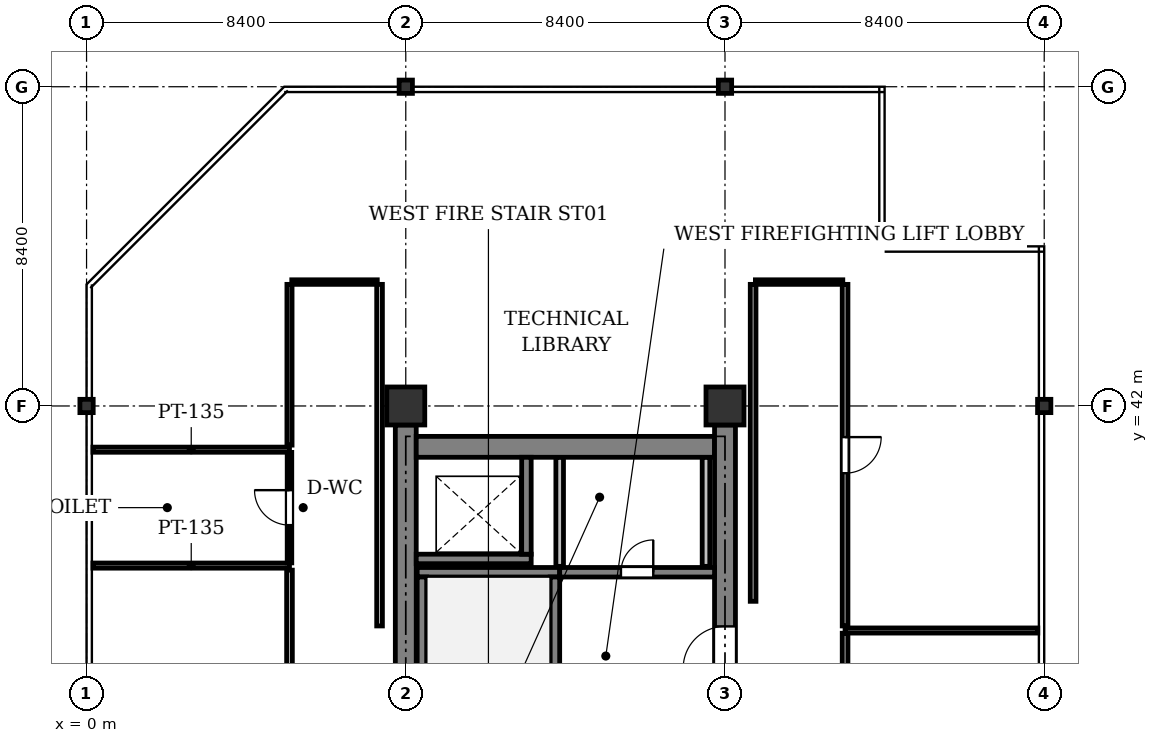
"""IFC4 building model, lengths in metres.
Left out: names, types, materials, properties, quantities, classifications, styles, units other than length and angle.
Written with IfcOpenShell. Run it as: python <this file> out.ifc"""

import sys

from ifc_helpers import new_model, si_unit, direction, frame, frame_2d, origin, origin_2d, place, context, subcontext, project, spatial, rectangle, i_section, extrude, element, fill, save


model = new_model("IFC4")
c1 = context("Model", 3, precision=1e-05, world=origin(), true_north=direction((0.0, 1.0)))
c2 = subcontext(c1, "Body", "Model", "MODEL_VIEW")
j1 = project(units=[si_unit("LENGTHUNIT", "METRE"), si_unit("PLANEANGLEUNIT", "RADIAN")], contexts=[c1])
p1 = place(None, origin())
s1 = spatial("IfcSite", under=j1, at=p1, CompositionType="ELEMENT")
p2 = place(p1, origin())
s2 = spatial("IfcBuilding", under=s1, at=p2, CompositionType="ELEMENT")
p3 = place(p2, frame((0.0, 0.0, 196.0)))
s3 = spatial("IfcBuildingStorey", under=s2, at=p3, CompositionType="ELEMENT", Elevation=196.0)
p4 = place(p3, frame((0.0, 42.0, 0.0), z_axis=(0.0, 0.0, 1.0), x_axis=(1.0, 0.0, 0.0)))
e1 = element("IfcColumn", 1, at=p4, inside=s3, PredefinedType="COLUMN", context=c2, shape_type="SweptSolid", body=[
    extrude(i_section(OverallWidth=0.35, OverallDepth=0.35, WebThickness=0.02, FlangeThickness=0.032, at=origin_2d()), origin(), (0.0, 0.0, 1.0), 4.1),
])
p5 = place(p3, frame((8.4, 42.0, 0.0), z_axis=(0.0, 0.0, 1.0), x_axis=(1.0, 0.0, 0.0)))
e2 = element("IfcColumn", 2, at=p5, inside=s3, PredefinedType="COLUMN", context=c2, shape_type="SweptSolid", body=[
    extrude(rectangle(XDim=1.0, YDim=1.0, at=origin_2d()), origin(), (0.0, 0.0, 1.0), 4.1),
])
p6 = place(p3, frame((8.4, 50.4, 0.0), z_axis=(0.0, 0.0, 1.0), x_axis=(1.0, 0.0, 0.0)))
e3 = element("IfcColumn", 3, at=p6, inside=s3, PredefinedType="COLUMN", context=c2, shape_type="SweptSolid", body=[
    extrude(i_section(OverallWidth=0.35, OverallDepth=0.35, WebThickness=0.02, FlangeThickness=0.032, at=origin_2d()), origin(), (0.0, 0.0, 1.0), 4.1),
])
p7 = place(p3, frame((16.8, 42.0, 0.0), z_axis=(0.0, 0.0, 1.0), x_axis=(1.0, 0.0, 0.0)))
e4 = element("IfcColumn", 4, at=p7, inside=s3, PredefinedType="COLUMN", context=c2, shape_type="SweptSolid", body=[
    extrude(rectangle(XDim=1.0, YDim=1.0, at=origin_2d()), origin(), (0.0, 0.0, 1.0), 4.1),
])
for number, where, z_axis, x_axis in (
    (5, (16.8, 50.4, 0.0), (0.0, 0.0, 1.0), (1.0, 0.0, 0.0)),
    (6, (25.2, 42.0, 0.0), (0.0, 0.0, 1.0), (1.0, 0.0, 0.0)),
):
    element("IfcColumn", number, at=place(p3, frame(where, z_axis=z_axis, x_axis=x_axis)), inside=s3, PredefinedType="COLUMN", context=c2, shape_type="SweptSolid", body=[
        extrude(i_section(OverallWidth=0.35, OverallDepth=0.35, WebThickness=0.02, FlangeThickness=0.032, at=origin_2d()), origin(), (0.0, 0.0, 1.0), 4.1),
    ])
p8 = place(p3, frame((8.4, 34.1, 0.0), z_axis=(0.0, 0.0, 1.0), x_axis=(0.0, 1.0, 0.0)))
e7 = element("IfcWall", 7, at=p8, inside=s3, PredefinedType="SHEAR", context=c2, shape_type="SweptSolid", body=[
    extrude(rectangle(XDim=7.4, YDim=0.55, at=frame_2d((3.7, 0.0))), origin(), (0.0, 0.0, 1.0), 3.825),
])
p9 = place(p3, frame((8.675, 40.925, 0.0), z_axis=(0.0, 0.0, 1.0), x_axis=(1.0, 0.0, 0.0)))
e8 = element("IfcWall", 8, at=p9, inside=s3, PredefinedType="SHEAR", context=c2, shape_type="SweptSolid", body=[
    extrude(rectangle(XDim=7.85, YDim=0.55, at=frame_2d((3.925, 0.0))), origin(), (0.0, 0.0, 1.0), 3.825),
])
p10 = place(p3, frame((16.8, 34.1, 0.0), z_axis=(0.0, 0.0, 1.0), x_axis=(0.0, 1.0, 0.0)))
e9 = element("IfcWall", 9, at=p10, inside=s3, PredefinedType="SHEAR", context=c2, shape_type="SweptSolid", body=[
    extrude(rectangle(XDim=7.4, YDim=0.55, at=frame_2d((3.7, 0.0))), origin(), (0.0, 0.0, 1.0), 3.825),
])
p11 = place(p10, frame((1.0, 0.0, 0.0)))
e10 = element("IfcOpeningElement", 10, at=p11, cuts=e9, PredefinedType="OPENING", context=c2, shape_type="SweptSolid", body=[
    extrude(rectangle(XDim=1.1, YDim=2.15, at=frame_2d((0.55, 1.075))), frame((0.0, 0.285, 0.0), z_axis=(0.0, -1.0, 0.0), x_axis=(1.0, 0.0, 0.0)), (0.0, 0.0, 1.0), 0.57),
])
p12 = place(p3, frame((12.45, 37.625, 0.0), z_axis=(0.0, 0.0, 1.0), x_axis=(-1.0, 0.0, 0.0)))
e11 = element("IfcWall", 11, at=p12, inside=s3, PredefinedType="SHEAR", context=c2, shape_type="SweptSolid", body=[
    extrude(rectangle(XDim=3.75, YDim=0.25, at=frame_2d((1.875, 0.0))), origin(), (0.0, 0.0, 1.0), 3.825),
])
p13 = place(p3, frame((12.325, 29.75, 0.0), z_axis=(0.0, 0.0, 1.0), x_axis=(0.0, 1.0, 0.0)))
e12 = element("IfcWall", 12, at=p13, inside=s3, PredefinedType="SHEAR", context=c2, shape_type="SweptSolid", body=[
    extrude(rectangle(XDim=7.75, YDim=0.25, at=frame_2d((3.875, 0.0))), origin(), (0.0, 0.0, 1.0), 3.825),
])
p14 = place(p13, frame((0.22, 0.0, 0.0)))
e13 = element("IfcOpeningElement", 13, at=p14, cuts=e12, PredefinedType="OPENING", context=c2, shape_type="SweptSolid", body=[
    extrude(rectangle(XDim=1.1, YDim=2.15, at=frame_2d((0.55, 1.075))), frame((0.0, 0.135, 0.0), z_axis=(0.0, -1.0, 0.0), x_axis=(1.0, 0.0, 0.0)), (0.0, 0.0, 1.0), 0.27),
])
p15 = place(p3, frame((8.825, 29.75, 0.0), z_axis=(0.0, 0.0, 1.0), x_axis=(0.0, 1.0, 0.0)))
e14 = element("IfcWall", 14, at=p15, inside=s3, PredefinedType="SHEAR", context=c2, shape_type="SweptSolid", body=[
    extrude(rectangle(XDim=7.75, YDim=0.25, at=frame_2d((3.875, 0.0))), origin(), (0.0, 0.0, 1.0), 3.825),
])
p16 = place(p3, frame((8.675, 37.975, 0.0), z_axis=(0.0, 0.0, 1.0), x_axis=(1.0, 0.0, 0.0)))
e15 = element("IfcWall", 15, at=p16, inside=s3, PredefinedType="SHEAR", context=c2, shape_type="SweptSolid", body=[
    extrude(rectangle(XDim=3.025, YDim=0.25, at=frame_2d((1.512, 0.0))), origin(), (0.0, 0.0, 1.0), 3.825),
])
p17 = place(p3, frame((11.575, 38.1, 0.0), z_axis=(0.0, 0.0, 1.0), x_axis=(0.0, 1.0, 0.0)))
e16 = element("IfcWall", 16, at=p17, inside=s3, PredefinedType="SHEAR", context=c2, shape_type="SweptSolid", body=[
    extrude(rectangle(XDim=2.55, YDim=0.25, at=frame_2d((1.275, 0.0))), origin(), (0.0, 0.0, 1.0), 3.825),
])
p18 = place(p3, frame((12.45, 37.625, 0.0), z_axis=(0.0, 0.0, 1.0), x_axis=(1.0, 0.0, 0.0)))
e17 = element("IfcWall", 17, at=p18, inside=s3, PredefinedType="SHEAR", context=c2, shape_type="SweptSolid", body=[
    extrude(rectangle(XDim=4.075, YDim=0.25, at=frame_2d((2.038, 0.0))), origin(), (0.0, 0.0, 1.0), 3.825),
])
p19 = place(p18, frame((1.613, 0.0, 0.0)))
e18 = element("IfcOpeningElement", 18, at=p19, cuts=e17, PredefinedType="OPENING", context=c2, shape_type="SweptSolid", body=[
    extrude(rectangle(XDim=0.85, YDim=2.15, at=frame_2d((0.425, 1.075))), frame((0.0, 0.135, 0.0), z_axis=(0.0, -1.0, 0.0), x_axis=(1.0, 0.0, 0.0)), (0.0, 0.0, 1.0), 0.27),
])
for number, where, z_axis, x_axis in (
    (19, (16.3, 37.78, 0.0), (0.0, 0.0, 1.0), (0.0, 1.0, 0.0)),
    (20, (12.45, 40.646, 0.0), (0.0, 0.0, 1.0), (0.0, -1.0, 0.0)),
):
    element("IfcWall", number, at=place(p3, frame(where, z_axis=z_axis, x_axis=x_axis)), inside=s3, PredefinedType="PARTITIONING", context=c2, shape_type="SweptSolid", body=[
        extrude(rectangle(XDim=2.866, YDim=0.2, at=frame_2d((1.433, 0.0))), origin(), (0.0, 0.0, 1.0), 2.875),
    ])
for number, where, z_axis, x_axis in (
    (21, (5.34, 40.85, 0.0), (0.0, 0.0, 1.0), (-1.0, 0.0, 0.0)),
    (22, (0.169, 37.8, 0.0), (0.0, 0.0, 1.0), (1.0, 0.0, 0.0)),
):
    element("IfcWall", number, at=place(p3, frame(where, z_axis=z_axis, x_axis=x_axis)), inside=s3, PredefinedType="PARTITIONING", context=c2, shape_type="SweptSolid", body=[
        extrude(rectangle(XDim=5.171, YDim=0.135, at=frame_2d((2.585, 0.0))), origin(), (0.0, 0.0, 1.0), 3.518),
    ])
p20 = place(p3, frame((5.34, 37.872, 0.0), z_axis=(0.0, 0.0, 1.0), x_axis=(0.0, 1.0, 0.0)))
e23 = element("IfcWall", 23, at=p20, inside=s3, PredefinedType="PARTITIONING", context=c2, shape_type="SweptSolid", body=[
    extrude(rectangle(XDim=2.907, YDim=0.12, at=frame_2d((1.454, 0.0))), origin(), (0.0, 0.0, 1.0), 3.825),
])
p21 = place(p20, frame((0.993, 0.0, 0.0)))
e24 = element("IfcOpeningElement", 24, at=p21, cuts=e23, PredefinedType="OPENING", context=c2, shape_type="SweptSolid", body=[
    extrude(rectangle(XDim=0.92, YDim=2.1, at=frame_2d((0.46, 1.05))), frame((0.0, 0.07, 0.0), z_axis=(0.0, -1.0, 0.0), x_axis=(1.0, 0.0, 0.0)), (0.0, 0.0, 1.0), 0.14),
])
p22 = place(p3, frame((25.031, 36.092, 0.0), z_axis=(0.0, 0.0, 1.0), x_axis=(-1.0, 0.0, 0.0)))
e25 = element("IfcWall", 25, at=p22, inside=s3, PredefinedType="PARTITIONING", context=c2, shape_type="SweptSolid", body=[
    extrude(rectangle(XDim=5.071, YDim=0.135, at=frame_2d((2.536, 0.0))), origin(), (0.0, 0.0, 1.0), 3.518),
])
p23 = place(p3, frame((19.96, 36.021, 0.0), z_axis=(0.0, 0.0, 1.0), x_axis=(0.0, -1.0, 0.0)))
e26 = element("IfcWall", 26, at=p23, inside=s3, PredefinedType="PARTITIONING", context=c2, shape_type="SweptSolid", body=[
    extrude(rectangle(XDim=13.17, YDim=0.15, at=frame_2d((6.585, 0.0))), origin(), (0.0, 0.0, 1.0), 3.365),
])
p24 = place(p3, frame((5.34, 18.76, 0.0), z_axis=(0.0, 0.0, 1.0), x_axis=(0.0, 1.0, 0.0)))
e27 = element("IfcWall", 27, at=p24, inside=s3, PredefinedType="PARTITIONING", context=c2, shape_type="SweptSolid", body=[
    extrude(rectangle(XDim=18.92, YDim=0.15, at=frame_2d((9.46, 0.0))), origin(), (0.0, 0.0, 1.0), 3.213),
])
p25 = place(p24, frame((8.985, 0.0, 0.0)))
e28 = element("IfcOpeningElement", 28, at=p25, cuts=e27, PredefinedType="OPENING", context=c2, shape_type="SweptSolid", body=[
    extrude(rectangle(XDim=0.95, YDim=2.15, at=frame_2d((0.475, 1.075))), frame((0.0, 0.085, 0.0), z_axis=(0.0, -1.0, 0.0), x_axis=(1.0, 0.0, 0.0)), (0.0, 0.0, 1.0), 0.17),
])
p26 = place(p3, frame((19.96, 45.2, 0.0), z_axis=(0.0, 0.0, 1.0), x_axis=(0.0, -1.0, 0.0)))
e29 = element("IfcWall", 29, at=p26, inside=s3, PredefinedType="PARTITIONING", context=c2, shape_type="SweptSolid", body=[
    extrude(rectangle(XDim=8.988, YDim=0.15, at=frame_2d((4.494, 0.0))), origin(), (0.0, 0.0, 1.0), 3.365),
])
p27 = place(p26, frame((4.019, 0.0, 0.0)))
e30 = element("IfcOpeningElement", 30, at=p27, cuts=e29, PredefinedType="OPENING", context=c2, shape_type="SweptSolid", body=[
    extrude(rectangle(XDim=0.95, YDim=2.15, at=frame_2d((0.475, 1.075))), frame((0.0, 0.085, 0.0), z_axis=(0.0, -1.0, 0.0), x_axis=(1.0, 0.0, 0.0)), (0.0, 0.0, 1.0), 0.17),
])
p28 = place(p3, frame((5.34, 40.97, 0.0), z_axis=(0.0, 0.0, 1.0), x_axis=(0.0, 1.0, 0.0)))
e31 = element("IfcWall", 31, at=p28, inside=s3, PredefinedType="PARTITIONING", context=c2, shape_type="SweptSolid", body=[
    extrude(rectangle(XDim=4.23, YDim=0.135, at=frame_2d((2.115, 0.0))), origin(), (0.0, 0.0, 1.0), 3.365),
])
p29 = place(p3, frame((5.4, 45.26, 0.0), z_axis=(0.0, 0.0, 1.0), x_axis=(1.0, 0.0, 0.0)))
e32 = element("IfcWall", 32, at=p29, inside=s3, PredefinedType="PARTITIONING", context=c2, shape_type="SweptSolid", body=[
    extrude(rectangle(XDim=2.25, YDim=0.12, at=frame_2d((1.125, 0.0))), origin(), (0.0, 0.0, 1.0), 3.825),
])
p30 = place(p3, frame((7.71, 45.2, 0.0), z_axis=(0.0, 0.0, 1.0), x_axis=(0.0, -1.0, 0.0)))
e33 = element("IfcWall", 33, at=p30, inside=s3, PredefinedType="PARTITIONING", context=c2, shape_type="SweptSolid", body=[
    extrude(rectangle(XDim=8.988, YDim=0.15, at=frame_2d((4.494, 0.0))), origin(), (0.0, 0.0, 1.0), 3.365),
])
p31 = place(p3, frame((17.54, 36.86, 0.0), z_axis=(0.0, 0.0, 1.0), x_axis=(0.0, 1.0, 0.0)))
e34 = element("IfcWall", 34, at=p31, inside=s3, PredefinedType="PARTITIONING", context=c2, shape_type="SweptSolid", body=[
    extrude(rectangle(XDim=8.34, YDim=0.15, at=frame_2d((4.17, 0.0))), origin(), (0.0, 0.0, 1.0), 3.365),
])
p32 = place(p3, frame((17.6, 45.26, 0.0), z_axis=(0.0, 0.0, 1.0), x_axis=(1.0, 0.0, 0.0)))
e35 = element("IfcWall", 35, at=p32, inside=s3, PredefinedType="PARTITIONING", context=c2, shape_type="SweptSolid", body=[
    extrude(rectangle(XDim=2.3, YDim=0.12, at=frame_2d((1.15, 0.0))), origin(), (0.0, 0.0, 1.0), 3.825),
])
p33 = place(p11, origin())
e36 = element("IfcDoor", 36, at=p33, inside=s3, OperationType="SINGLE_SWING_LEFT", PredefinedType="DOOR", context=c2, shape_type="SweptSolid", body=[
    extrude(rectangle(XDim=1.1, YDim=2.15, at=frame_2d((0.55, 1.075))), frame((0.0, 0.025, 0.0), z_axis=(0.0, -1.0, 0.0), x_axis=(1.0, 0.0, 0.0)), (0.0, 0.0, 1.0), 0.05),
])
fill(e10, e36)
p34 = place(p19, origin())
e37 = element("IfcDoor", 37, at=p34, inside=s3, OperationType="SINGLE_SWING_RIGHT", PredefinedType="DOOR", context=c2, shape_type="SweptSolid", body=[
    extrude(rectangle(XDim=0.85, YDim=2.15, at=frame_2d((0.425, 1.075))), frame((0.0, 0.025, 0.0), z_axis=(0.0, -1.0, 0.0), x_axis=(1.0, 0.0, 0.0)), (0.0, 0.0, 1.0), 0.05),
])
fill(e18, e37)
p35 = place(p21, origin())
e38 = element("IfcDoor", 38, at=p35, inside=s3, OperationType="SINGLE_SWING_RIGHT", PredefinedType="DOOR", context=c2, shape_type="SweptSolid", body=[
    extrude(rectangle(XDim=0.92, YDim=2.1, at=frame_2d((0.46, 1.05))), frame((0.0, 0.025, 0.0), z_axis=(0.0, -1.0, 0.0), x_axis=(1.0, 0.0, 0.0)), (0.0, 0.0, 1.0), 0.05),
])
fill(e24, e38)
p36 = place(p27, origin())
e39 = element("IfcDoor", 39, at=p36, inside=s3, OperationType="SINGLE_SWING_LEFT", PredefinedType="DOOR", context=c2, shape_type="SweptSolid", body=[
    extrude(rectangle(XDim=0.95, YDim=2.15, at=frame_2d((0.475, 1.075))), frame((0.0, 0.025, 0.0), z_axis=(0.0, -1.0, 0.0), x_axis=(1.0, 0.0, 0.0)), (0.0, 0.0, 1.0), 0.05),
])
fill(e30, e39)
save(model, sys.argv[1])
